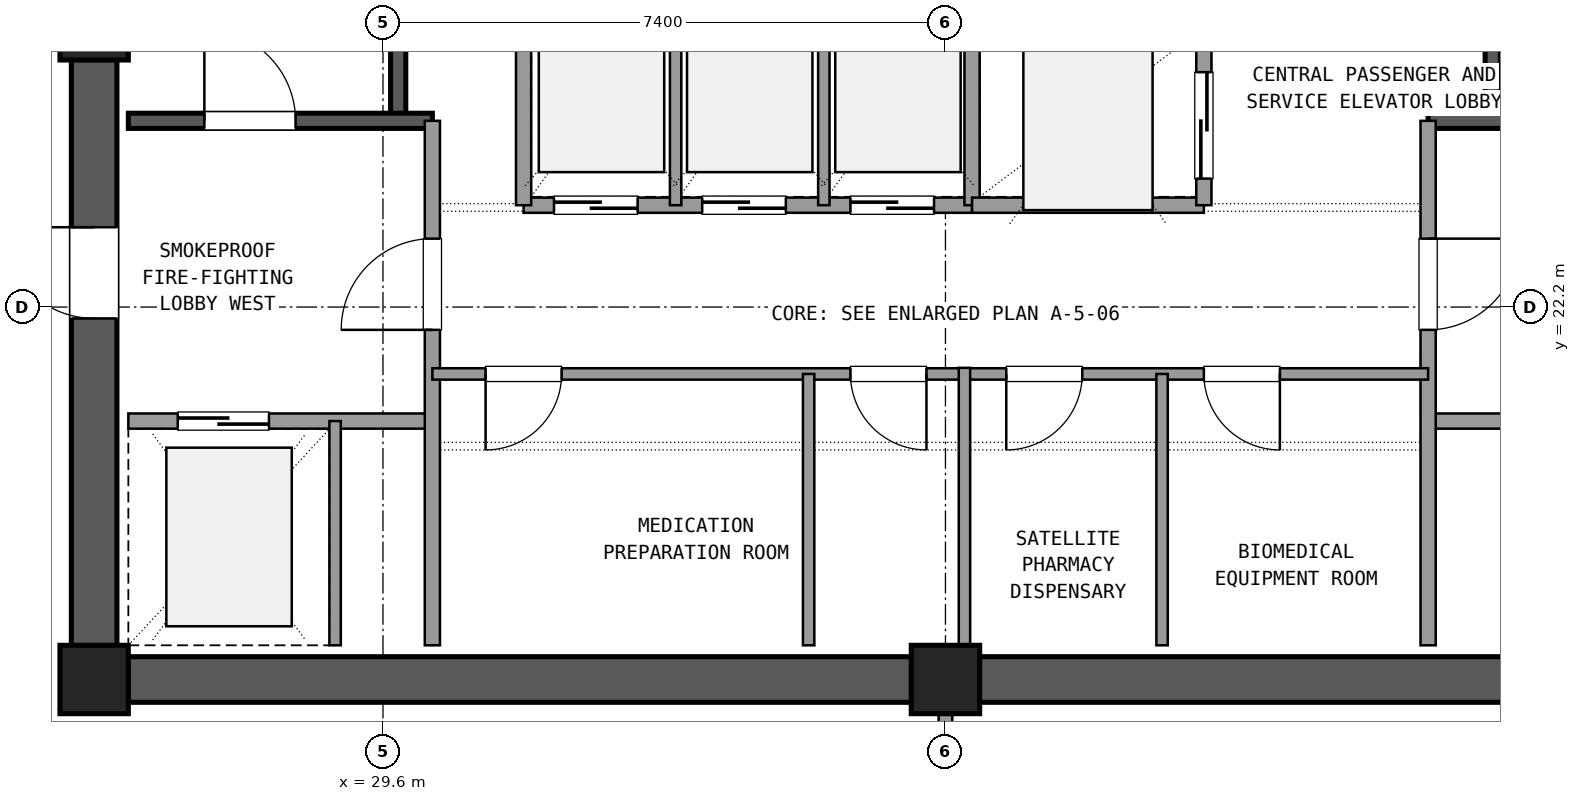
"""IFC4 building model, lengths in metres.
Left out: names, types, materials, properties, quantities, classifications, styles, units other than length and angle.
Written with IfcOpenShell. Run it as: python <this file> out.ifc"""

import sys

from ifc_helpers import new_model, si_unit, direction, frame, frame_2d, origin, origin_2d, place, context, subcontext, project, spatial, rectangle, extrude, element, fill, save


model = new_model("IFC4")
c1 = context("Model", 3, precision=1e-05, world=origin(), true_north=direction((0.0, 1.0)))
c2 = subcontext(c1, "Body", "Model", "MODEL_VIEW")
j1 = project(units=[si_unit("LENGTHUNIT", "METRE"), si_unit("PLANEANGLEUNIT", "RADIAN")], contexts=[c1])
p1 = place(None, origin())
s1 = spatial("IfcSite", under=j1, at=p1, CompositionType="ELEMENT")
p2 = place(p1, origin())
s2 = spatial("IfcBuilding", under=s1, at=p2, CompositionType="ELEMENT")
p3 = place(p2, frame((0.0, 0.0, 221.58)))
s3 = spatial("IfcBuildingStorey", under=s2, at=p3, CompositionType="ELEMENT", Elevation=221.58)
for number, where, z_axis, x_axis in (
    (1, (25.8, 17.3, 0.0), (0.0, 0.0, 1.0), (1.0, 0.0, 0.0)),
    (2, (37.0, 17.3, 0.0), (0.0, 0.0, 1.0), (1.0, 0.0, 0.0)),
    (3, (25.8, 25.9, 0.0), (0.0, 0.0, 1.0), (1.0, 0.0, 0.0)),
):
    element("IfcColumn", number, at=place(p3, frame(where, z_axis=z_axis, x_axis=x_axis)), inside=s3, PredefinedType="COLUMN", context=c2, shape_type="SweptSolid", body=[
        extrude(rectangle(XDim=0.9, YDim=0.9, at=origin_2d()), origin(), (0.0, 0.0, 1.0), 3.6),
    ])
for number, where, z_axis, x_axis in (
    (4, (26.245, 17.3, 0.0), (0.0, 0.0, 1.0), (1.0, 0.0, 0.0)),
    (5, (37.445, 17.3, 0.0), (0.0, 0.0, 1.0), (1.0, 0.0, 0.0)),
):
    element("IfcWall", number, at=place(p3, frame(where, z_axis=z_axis, x_axis=x_axis)), inside=s3, PredefinedType="SHEAR", context=c2, shape_type="SweptSolid", body=[
        extrude(rectangle(XDim=10.31, YDim=0.6, at=frame_2d((5.155, 0.0))), origin(), (0.0, 0.0, 1.0), 3.32),
    ])
p4 = place(p3, frame((25.8, 25.455, 0.0), z_axis=(0.0, 0.0, 1.0), x_axis=(0.0, -1.0, 0.0)))
e6 = element("IfcWall", 6, at=p4, inside=s3, PredefinedType="SHEAR", context=c2, shape_type="SweptSolid", body=[
    extrude(rectangle(XDim=7.71, YDim=0.6, at=frame_2d((3.855, 0.0))), origin(), (0.0, 0.0, 1.0), 3.32),
])
p5 = place(p4, frame((2.205, 0.0, 0.0)))
e7 = element("IfcOpeningElement", 7, at=p5, cuts=e6, PredefinedType="OPENING", context=c2, shape_type="SweptSolid", body=[
    extrude(rectangle(XDim=1.2, YDim=2.15, at=frame_2d((0.6, 1.075))), frame((0.0, 0.31, 0.0), z_axis=(0.0, -1.0, 0.0), x_axis=(1.0, 0.0, 0.0)), (0.0, 0.0, 1.0), 0.62),
])
p6 = place(p3, frame((29.8, 24.65, 0.0), z_axis=(0.0, 0.0, 1.0), x_axis=(0.0, 1.0, 0.0)))
e8 = element("IfcWall", 8, at=p6, inside=s3, PredefinedType="SHEAR", context=c2, shape_type="SweptSolid", body=[
    extrude(rectangle(XDim=9.4, YDim=0.2, at=frame_2d((4.7, 0.0))), origin(), (0.0, 0.0, 1.0), 3.32),
])
p7 = place(p3, frame((26.25, 24.65, 0.0), z_axis=(0.0, 0.0, 1.0), x_axis=(1.0, 0.0, 0.0)))
e9 = element("IfcWall", 9, at=p7, inside=s3, PredefinedType="SHEAR", context=c2, shape_type="SweptSolid", body=[
    extrude(rectangle(XDim=4.0, YDim=0.2, at=frame_2d((2.0, 0.0))), origin(), (0.0, 0.0, 1.0), 3.32),
])
p8 = place(p7, frame((1.0, 0.0, 0.0)))
e10 = element("IfcOpeningElement", 10, at=p8, cuts=e9, PredefinedType="OPENING", context=c2, shape_type="SweptSolid", body=[
    extrude(rectangle(XDim=1.2, YDim=2.15, at=frame_2d((0.6, 1.075))), frame((0.0, 0.11, 0.0), z_axis=(0.0, -1.0, 0.0), x_axis=(1.0, 0.0, 0.0)), (0.0, 0.0, 1.0), 0.22),
])
p9 = place(p3, frame((44.2, 24.65, 0.0), z_axis=(0.0, 0.0, 1.0), x_axis=(0.0, 1.0, 0.0)))
e11 = element("IfcWall", 11, at=p9, inside=s3, PredefinedType="SHEAR", context=c2, shape_type="SweptSolid", body=[
    extrude(rectangle(XDim=9.4, YDim=0.2, at=frame_2d((4.7, 0.0))), origin(), (0.0, 0.0, 1.0), 3.32),
])
p10 = place(p3, frame((43.35, 24.65, 0.0), z_axis=(0.0, 0.0, 1.0), x_axis=(1.0, 0.0, 0.0)))
e12 = element("IfcWall", 12, at=p10, inside=s3, PredefinedType="SHEAR", context=c2, shape_type="SweptSolid", body=[
    extrude(rectangle(XDim=4.4, YDim=0.2, at=frame_2d((2.2, 0.0))), origin(), (0.0, 0.0, 1.0), 3.32),
])
p11 = place(p10, frame((2.0, 0.0, 0.0)))
e13 = element("IfcOpeningElement", 13, at=p11, cuts=e12, PredefinedType="OPENING", context=c2, shape_type="SweptSolid", body=[
    extrude(rectangle(XDim=1.2, YDim=2.15, at=frame_2d((0.6, 1.075))), frame((0.0, 0.11, 0.0), z_axis=(0.0, -1.0, 0.0), x_axis=(1.0, 0.0, 0.0)), (0.0, 0.0, 1.0), 0.22),
])
p12 = place(p3, frame((26.25, 20.7, 0.0), z_axis=(0.0, 0.0, 1.0), x_axis=(1.0, 0.0, 0.0)))
e14 = element("IfcWall", 14, at=p12, inside=s3, PredefinedType="SOLIDWALL", context=c2, shape_type="SweptSolid", body=[
    extrude(rectangle(XDim=4.0, YDim=0.2, at=frame_2d((2.0, 0.0))), origin(), (0.0, 0.0, 1.0), 2.61),
])
p13 = place(p12, frame((0.65, 0.0, 0.0)))
e15 = element("IfcOpeningElement", 15, at=p13, cuts=e14, PredefinedType="OPENING", context=c2, shape_type="SweptSolid", body=[
    extrude(rectangle(XDim=1.2, YDim=2.15, at=frame_2d((0.6, 1.075))), frame((0.0, 0.11, 0.0), z_axis=(0.0, -1.0, 0.0), x_axis=(1.0, 0.0, 0.0)), (0.0, 0.0, 1.0), 0.22),
])
p14 = place(p3, frame((30.25, 17.75, 0.0), z_axis=(0.0, 0.0, 1.0), x_axis=(0.0, 1.0, 0.0)))
e16 = element("IfcWall", 16, at=p14, inside=s3, PredefinedType="SOLIDWALL", context=c2, shape_type="SweptSolid", body=[
    extrude(rectangle(XDim=6.9, YDim=0.2, at=frame_2d((3.45, 0.0))), origin(), (0.0, 0.0, 1.0), 2.61),
])
p15 = place(p14, frame((4.15, 0.0, 0.0)))
e17 = element("IfcOpeningElement", 17, at=p15, cuts=e16, PredefinedType="OPENING", context=c2, shape_type="SweptSolid", body=[
    extrude(rectangle(XDim=1.2, YDim=2.15, at=frame_2d((0.6, 1.075))), frame((0.0, 0.11, 0.0), z_axis=(0.0, -1.0, 0.0), x_axis=(1.0, 0.0, 0.0)), (0.0, 0.0, 1.0), 0.22),
])
p16 = place(p3, frame((28.97, 17.75, 0.0), z_axis=(0.0, 0.0, 1.0), x_axis=(0.0, 1.0, 0.0)))
e18 = element("IfcWall", 18, at=p16, inside=s3, PredefinedType="PARTITIONING", context=c2, shape_type="SweptSolid", body=[
    extrude(rectangle(XDim=2.95, YDim=0.15, at=frame_2d((1.475, 0.0))), origin(), (0.0, 0.0, 1.0), 2.61),
])
p17 = place(p3, frame((43.35, 20.7, 0.0), z_axis=(0.0, 0.0, 1.0), x_axis=(1.0, 0.0, 0.0)))
e19 = element("IfcWall", 19, at=p17, inside=s3, PredefinedType="SOLIDWALL", context=c2, shape_type="SweptSolid", body=[
    extrude(rectangle(XDim=4.4, YDim=0.2, at=frame_2d((2.2, 0.0))), origin(), (0.0, 0.0, 1.0), 2.61),
])
p18 = place(p17, frame((2.35, 0.0, 0.0)))
e20 = element("IfcOpeningElement", 20, at=p18, cuts=e19, PredefinedType="OPENING", context=c2, shape_type="SweptSolid", body=[
    extrude(rectangle(XDim=1.2, YDim=2.15, at=frame_2d((0.6, 1.075))), frame((0.0, 0.11, 0.0), z_axis=(0.0, -1.0, 0.0), x_axis=(1.0, 0.0, 0.0)), (0.0, 0.0, 1.0), 0.22),
])
p19 = place(p3, frame((43.35, 17.75, 0.0), z_axis=(0.0, 0.0, 1.0), x_axis=(0.0, 1.0, 0.0)))
e21 = element("IfcWall", 21, at=p19, inside=s3, PredefinedType="SOLIDWALL", context=c2, shape_type="SweptSolid", body=[
    extrude(rectangle(XDim=6.9, YDim=0.2, at=frame_2d((3.45, 0.0))), origin(), (0.0, 0.0, 1.0), 2.61),
])
p20 = place(p19, frame((4.15, 0.0, 0.0)))
e22 = element("IfcOpeningElement", 22, at=p20, cuts=e21, PredefinedType="OPENING", context=c2, shape_type="SweptSolid", body=[
    extrude(rectangle(XDim=1.2, YDim=2.15, at=frame_2d((0.6, 1.075))), frame((0.0, 0.11, 0.0), z_axis=(0.0, -1.0, 0.0), x_axis=(1.0, 0.0, 0.0)), (0.0, 0.0, 1.0), 0.22),
])
p21 = place(p3, frame((30.25, 21.32, 0.0), z_axis=(0.0, 0.0, 1.0), x_axis=(1.0, 0.0, 0.0)))
e23 = element("IfcWall", 23, at=p21, inside=s3, PredefinedType="PARTITIONING", context=c2, shape_type="SweptSolid", body=[
    extrude(rectangle(XDim=7.0, YDim=0.15, at=frame_2d((3.5, 0.0))), origin(), (0.0, 0.0, 1.0), 2.61),
])
p22 = place(p21, frame((0.7, 0.0, 0.0)))
e24 = element("IfcOpeningElement", 24, at=p22, cuts=e23, PredefinedType="OPENING", context=c2, shape_type="SweptSolid", body=[
    extrude(rectangle(XDim=1.0, YDim=2.15, at=frame_2d((0.5, 1.075))), frame((0.0, 0.085, 0.0), z_axis=(0.0, -1.0, 0.0), x_axis=(1.0, 0.0, 0.0)), (0.0, 0.0, 1.0), 0.17),
])
p23 = place(p21, frame((5.5, 0.0, 0.0)))
e25 = element("IfcOpeningElement", 25, at=p23, cuts=e23, PredefinedType="OPENING", context=c2, shape_type="SweptSolid", body=[
    extrude(rectangle(XDim=1.0, YDim=2.15, at=frame_2d((0.5, 1.075))), frame((0.0, 0.085, 0.0), z_axis=(0.0, -1.0, 0.0), x_axis=(1.0, 0.0, 0.0)), (0.0, 0.0, 1.0), 0.17),
])
p24 = place(p3, frame((35.2, 17.75, 0.0), z_axis=(0.0, 0.0, 1.0), x_axis=(0.0, 1.0, 0.0)))
e26 = element("IfcWall", 26, at=p24, inside=s3, PredefinedType="PARTITIONING", context=c2, shape_type="SweptSolid", body=[
    extrude(rectangle(XDim=3.57, YDim=0.15, at=frame_2d((1.785, 0.0))), origin(), (0.0, 0.0, 1.0), 2.61),
])
p25 = place(p3, frame((37.25, 21.32, 0.0), z_axis=(0.0, 0.0, 1.0), x_axis=(1.0, 0.0, 0.0)))
e27 = element("IfcWall", 27, at=p25, inside=s3, PredefinedType="PARTITIONING", context=c2, shape_type="SweptSolid", body=[
    extrude(rectangle(XDim=6.1, YDim=0.15, at=frame_2d((3.05, 0.0))), origin(), (0.0, 0.0, 1.0), 2.61),
])
p26 = place(p25, frame((0.55, 0.0, 0.0)))
e28 = element("IfcOpeningElement", 28, at=p26, cuts=e27, PredefinedType="OPENING", context=c2, shape_type="SweptSolid", body=[
    extrude(rectangle(XDim=1.0, YDim=2.15, at=frame_2d((0.5, 1.075))), frame((0.0, 0.085, 0.0), z_axis=(0.0, -1.0, 0.0), x_axis=(1.0, 0.0, 0.0)), (0.0, 0.0, 1.0), 0.17),
])
p27 = place(p25, frame((3.15, 0.0, 0.0)))
e29 = element("IfcOpeningElement", 29, at=p27, cuts=e27, PredefinedType="OPENING", context=c2, shape_type="SweptSolid", body=[
    extrude(rectangle(XDim=1.0, YDim=2.15, at=frame_2d((0.5, 1.075))), frame((0.0, 0.085, 0.0), z_axis=(0.0, -1.0, 0.0), x_axis=(1.0, 0.0, 0.0)), (0.0, 0.0, 1.0), 0.17),
])
p28 = place(p3, frame((39.85, 17.75, 0.0), z_axis=(0.0, 0.0, 1.0), x_axis=(0.0, 1.0, 0.0)))
e30 = element("IfcWall", 30, at=p28, inside=s3, PredefinedType="PARTITIONING", context=c2, shape_type="SweptSolid", body=[
    extrude(rectangle(XDim=3.57, YDim=0.15, at=frame_2d((1.785, 0.0))), origin(), (0.0, 0.0, 1.0), 2.61),
])
p29 = place(p3, frame((37.25, 17.75, 0.0), z_axis=(0.0, 0.0, 1.0), x_axis=(0.0, 1.0, 0.0)))
e31 = element("IfcWall", 31, at=p29, inside=s3, PredefinedType="PARTITIONING", context=c2, shape_type="SweptSolid", body=[
    extrude(rectangle(XDim=3.65, YDim=0.15, at=frame_2d((1.825, 0.0))), origin(), (0.0, 0.0, 1.0), 2.61),
])
p30 = place(p3, frame((31.45, 23.54, 0.0), z_axis=(0.0, 0.0, 1.0), x_axis=(1.0, 0.0, 0.0)))
e32 = element("IfcWall", 32, at=p30, inside=s3, PredefinedType="SOLIDWALL", context=c2, shape_type="SweptSolid", body=[
    extrude(rectangle(XDim=5.9, YDim=0.2, at=frame_2d((2.95, 0.0))), origin(), (0.0, 0.0, 1.0), 2.61),
])
p31 = place(p30, frame((0.4, 0.0, 0.0)))
e33 = element("IfcOpeningElement", 33, at=p31, cuts=e32, PredefinedType="OPENING", context=c2, shape_type="SweptSolid", body=[
    extrude(rectangle(XDim=1.1, YDim=2.15, at=frame_2d((0.55, 1.075))), frame((0.0, 0.11, 0.0), z_axis=(0.0, -1.0, 0.0), x_axis=(1.0, 0.0, 0.0)), (0.0, 0.0, 1.0), 0.22),
])
p32 = place(p30, frame((2.35, 0.0, 0.0)))
e34 = element("IfcOpeningElement", 34, at=p32, cuts=e32, PredefinedType="OPENING", context=c2, shape_type="SweptSolid", body=[
    extrude(rectangle(XDim=1.1, YDim=2.15, at=frame_2d((0.55, 1.075))), frame((0.0, 0.11, 0.0), z_axis=(0.0, -1.0, 0.0), x_axis=(1.0, 0.0, 0.0)), (0.0, 0.0, 1.0), 0.22),
])
p33 = place(p30, frame((4.3, 0.0, 0.0)))
e35 = element("IfcOpeningElement", 35, at=p33, cuts=e32, PredefinedType="OPENING", context=c2, shape_type="SweptSolid", body=[
    extrude(rectangle(XDim=1.1, YDim=2.15, at=frame_2d((0.55, 1.075))), frame((0.0, 0.11, 0.0), z_axis=(0.0, -1.0, 0.0), x_axis=(1.0, 0.0, 0.0)), (0.0, 0.0, 1.0), 0.22),
])
p34 = place(p3, frame((31.45, 23.54, 0.0), z_axis=(0.0, 0.0, 1.0), x_axis=(0.0, 1.0, 0.0)))
e36 = element("IfcWall", 36, at=p34, inside=s3, PredefinedType="SOLIDWALL", context=c2, shape_type="SweptSolid", body=[
    extrude(rectangle(XDim=2.81, YDim=0.2, at=frame_2d((1.405, 0.0))), origin(), (0.0, 0.0, 1.0), 2.61),
])
for number, where, z_axis, x_axis in (
    (37, (33.45, 23.54, 0.0), (0.0, 0.0, 1.0), (0.0, 1.0, 0.0)),
    (38, (35.4, 23.54, 0.0), (0.0, 0.0, 1.0), (0.0, 1.0, 0.0)),
):
    element("IfcWall", number, at=place(p3, frame(where, z_axis=z_axis, x_axis=x_axis)), inside=s3, PredefinedType="PARTITIONING", context=c2, shape_type="SweptSolid", body=[
        extrude(rectangle(XDim=2.81, YDim=0.15, at=frame_2d((1.405, 0.0))), origin(), (0.0, 0.0, 1.0), 2.61),
    ])
p35 = place(p3, frame((37.35, 23.54, 0.0), z_axis=(0.0, 0.0, 1.0), x_axis=(0.0, 1.0, 0.0)))
e39 = element("IfcWall", 39, at=p35, inside=s3, PredefinedType="SOLIDWALL", context=c2, shape_type="SweptSolid", body=[
    extrude(rectangle(XDim=6.82, YDim=0.2, at=frame_2d((3.41, 0.0))), origin(), (0.0, 0.0, 1.0), 2.61),
])
p36 = place(p3, frame((37.35, 23.54, 0.0), z_axis=(0.0, 0.0, 1.0), x_axis=(1.0, 0.0, 0.0)))
e40 = element("IfcWall", 40, at=p36, inside=s3, PredefinedType="SOLIDWALL", context=c2, shape_type="SweptSolid", body=[
    extrude(rectangle(XDim=3.05, YDim=0.2, at=frame_2d((1.525, 0.0))), origin(), (0.0, 0.0, 1.0), 2.61),
])
p37 = place(p3, frame((40.4, 23.54, 0.0), z_axis=(0.0, 0.0, 1.0), x_axis=(0.0, 1.0, 0.0)))
e41 = element("IfcWall", 41, at=p37, inside=s3, PredefinedType="SOLIDWALL", context=c2, shape_type="SweptSolid", body=[
    extrude(rectangle(XDim=6.82, YDim=0.2, at=frame_2d((3.41, 0.0))), origin(), (0.0, 0.0, 1.0), 2.61),
])
p38 = place(p37, frame((0.35, 0.0, 0.0)))
e42 = element("IfcOpeningElement", 42, at=p38, cuts=e41, PredefinedType="OPENING", context=c2, shape_type="SweptSolid", body=[
    extrude(rectangle(XDim=1.4, YDim=2.2, at=frame_2d((0.7, 1.1))), frame((0.0, 0.11, 0.0), z_axis=(0.0, -1.0, 0.0), x_axis=(1.0, 0.0, 0.0)), (0.0, 0.0, 1.0), 0.22),
])
p39 = place(p37, frame((2.65, 0.0, 0.0)))
e43 = element("IfcOpeningElement", 43, at=p39, cuts=e41, PredefinedType="OPENING", context=c2, shape_type="SweptSolid", body=[
    extrude(rectangle(XDim=1.4, YDim=2.2, at=frame_2d((0.7, 1.1))), frame((0.0, 0.11, 0.0), z_axis=(0.0, -1.0, 0.0), x_axis=(1.0, 0.0, 0.0)), (0.0, 0.0, 1.0), 0.22),
])
p40 = place(p37, frame((4.85, 0.0, 0.0)))
e44 = element("IfcOpeningElement", 44, at=p40, cuts=e41, PredefinedType="OPENING", context=c2, shape_type="SweptSolid", body=[
    extrude(rectangle(XDim=1.4, YDim=2.2, at=frame_2d((0.7, 1.1))), frame((0.0, 0.11, 0.0), z_axis=(0.0, -1.0, 0.0), x_axis=(1.0, 0.0, 0.0)), (0.0, 0.0, 1.0), 0.22),
])
p41 = place(p3, frame((37.0, 14.15, 0.0), z_axis=(0.0, 0.0, 1.0), x_axis=(0.0, 1.0, 0.0)))
e45 = element("IfcWall", 45, at=p41, inside=s3, PredefinedType="PARTITIONING", context=c2, shape_type="SweptSolid", body=[
    extrude(rectangle(XDim=2.7, YDim=0.18, at=frame_2d((1.35, 0.0))), origin(), (0.0, 0.0, 1.0), 2.61),
])
p42 = place(p41, frame((0.35, 0.0, 0.0)))
e46 = element("IfcOpeningElement", 46, at=p42, cuts=e45, PredefinedType="OPENING", context=c2, shape_type="SweptSolid", body=[
    extrude(rectangle(XDim=2.0, YDim=2.2, at=frame_2d((1.0, 1.1))), frame((0.0, 0.1, 0.0), z_axis=(0.0, -1.0, 0.0), x_axis=(1.0, 0.0, 0.0)), (0.0, 0.0, 1.0), 0.2),
])
p43 = place(p8, origin())
e47 = element("IfcDoor", 47, at=p43, inside=s3, OperationType="SINGLE_SWING_LEFT", PredefinedType="DOOR", context=c2, shape_type="SweptSolid", body=[
    extrude(rectangle(XDim=1.2, YDim=2.15, at=frame_2d((0.6, 1.075))), frame((0.0, 0.025, 0.0), z_axis=(0.0, -1.0, 0.0), x_axis=(1.0, 0.0, 0.0)), (0.0, 0.0, 1.0), 0.05),
])
fill(e10, e47)
p44 = place(p13, origin())
e48 = element("IfcDoor", 48, at=p44, inside=s3, OperationType="SLIDING_TO_LEFT", PredefinedType="DOOR", context=c2, shape_type="SweptSolid", body=[
    extrude(rectangle(XDim=1.2, YDim=2.15, at=frame_2d((0.6, 1.075))), frame((0.0, 0.025, 0.0), z_axis=(0.0, -1.0, 0.0), x_axis=(1.0, 0.0, 0.0)), (0.0, 0.0, 1.0), 0.05),
])
fill(e15, e48)
p45 = place(p15, origin())
e49 = element("IfcDoor", 49, at=p45, inside=s3, OperationType="SINGLE_SWING_LEFT", PredefinedType="DOOR", context=c2, shape_type="SweptSolid", body=[
    extrude(rectangle(XDim=1.2, YDim=2.15, at=frame_2d((0.6, 1.075))), frame((0.0, 0.025, 0.0), z_axis=(0.0, -1.0, 0.0), x_axis=(1.0, 0.0, 0.0)), (0.0, 0.0, 1.0), 0.05),
])
fill(e17, e49)
p46 = place(p20, frame((1.2, 0.0, 0.0), z_axis=(0.0, 0.0, 1.0), x_axis=(-1.0, 0.0, 0.0)))
e50 = element("IfcDoor", 50, at=p46, inside=s3, OperationType="SINGLE_SWING_RIGHT", PredefinedType="DOOR", context=c2, shape_type="SweptSolid", body=[
    extrude(rectangle(XDim=1.2, YDim=2.15, at=frame_2d((0.6, 1.075))), frame((0.0, 0.025, 0.0), z_axis=(0.0, -1.0, 0.0), x_axis=(1.0, 0.0, 0.0)), (0.0, 0.0, 1.0), 0.05),
])
fill(e22, e50)
p47 = place(p5, frame((1.2, 0.0, 0.0), z_axis=(0.0, 0.0, 1.0), x_axis=(-1.0, 0.0, 0.0)))
e51 = element("IfcDoor", 51, at=p47, inside=s3, OperationType="SINGLE_SWING_LEFT", PredefinedType="DOOR", context=c2, shape_type="SweptSolid", body=[
    extrude(rectangle(XDim=1.2, YDim=2.15, at=frame_2d((0.6, 1.075))), frame((0.0, 0.025, 0.0), z_axis=(0.0, -1.0, 0.0), x_axis=(1.0, 0.0, 0.0)), (0.0, 0.0, 1.0), 0.05),
])
fill(e7, e51)
p48 = place(p22, frame((1.0, 0.0, 0.0), z_axis=(0.0, 0.0, 1.0), x_axis=(-1.0, 0.0, 0.0)))
e52 = element("IfcDoor", 52, at=p48, inside=s3, OperationType="SINGLE_SWING_LEFT", PredefinedType="DOOR", context=c2, shape_type="SweptSolid", body=[
    extrude(rectangle(XDim=1.0, YDim=2.15, at=frame_2d((0.5, 1.075))), frame((0.0, 0.025, 0.0), z_axis=(0.0, -1.0, 0.0), x_axis=(1.0, 0.0, 0.0)), (0.0, 0.0, 1.0), 0.05),
])
fill(e24, e52)
p49 = place(p23, frame((1.0, 0.0, 0.0), z_axis=(0.0, 0.0, 1.0), x_axis=(-1.0, 0.0, 0.0)))
e53 = element("IfcDoor", 53, at=p49, inside=s3, OperationType="SINGLE_SWING_RIGHT", PredefinedType="DOOR", context=c2, shape_type="SweptSolid", body=[
    extrude(rectangle(XDim=1.0, YDim=2.15, at=frame_2d((0.5, 1.075))), frame((0.0, 0.025, 0.0), z_axis=(0.0, -1.0, 0.0), x_axis=(1.0, 0.0, 0.0)), (0.0, 0.0, 1.0), 0.05),
])
fill(e25, e53)
p50 = place(p26, frame((1.0, 0.0, 0.0), z_axis=(0.0, 0.0, 1.0), x_axis=(-1.0, 0.0, 0.0)))
e54 = element("IfcDoor", 54, at=p50, inside=s3, OperationType="SINGLE_SWING_LEFT", PredefinedType="DOOR", context=c2, shape_type="SweptSolid", body=[
    extrude(rectangle(XDim=1.0, YDim=2.15, at=frame_2d((0.5, 1.075))), frame((0.0, 0.025, 0.0), z_axis=(0.0, -1.0, 0.0), x_axis=(1.0, 0.0, 0.0)), (0.0, 0.0, 1.0), 0.05),
])
fill(e28, e54)
p51 = place(p27, frame((1.0, 0.0, 0.0), z_axis=(0.0, 0.0, 1.0), x_axis=(-1.0, 0.0, 0.0)))
e55 = element("IfcDoor", 55, at=p51, inside=s3, OperationType="SINGLE_SWING_RIGHT", PredefinedType="DOOR", context=c2, shape_type="SweptSolid", body=[
    extrude(rectangle(XDim=1.0, YDim=2.15, at=frame_2d((0.5, 1.075))), frame((0.0, 0.025, 0.0), z_axis=(0.0, -1.0, 0.0), x_axis=(1.0, 0.0, 0.0)), (0.0, 0.0, 1.0), 0.05),
])
fill(e29, e55)
p52 = place(p31, origin())
e56 = element("IfcDoor", 56, at=p52, inside=s3, OperationType="SLIDING_TO_RIGHT", PredefinedType="DOOR", context=c2, shape_type="SweptSolid", body=[
    extrude(rectangle(XDim=1.1, YDim=2.15, at=frame_2d((0.55, 1.075))), frame((0.0, 0.025, 0.0), z_axis=(0.0, -1.0, 0.0), x_axis=(1.0, 0.0, 0.0)), (0.0, 0.0, 1.0), 0.05),
])
fill(e33, e56)
p53 = place(p32, origin())
e57 = element("IfcDoor", 57, at=p53, inside=s3, OperationType="SLIDING_TO_RIGHT", PredefinedType="DOOR", context=c2, shape_type="SweptSolid", body=[
    extrude(rectangle(XDim=1.1, YDim=2.15, at=frame_2d((0.55, 1.075))), frame((0.0, 0.025, 0.0), z_axis=(0.0, -1.0, 0.0), x_axis=(1.0, 0.0, 0.0)), (0.0, 0.0, 1.0), 0.05),
])
fill(e34, e57)
p54 = place(p33, origin())
e58 = element("IfcDoor", 58, at=p54, inside=s3, OperationType="SLIDING_TO_RIGHT", PredefinedType="DOOR", context=c2, shape_type="SweptSolid", body=[
    extrude(rectangle(XDim=1.1, YDim=2.15, at=frame_2d((0.55, 1.075))), frame((0.0, 0.025, 0.0), z_axis=(0.0, -1.0, 0.0), x_axis=(1.0, 0.0, 0.0)), (0.0, 0.0, 1.0), 0.05),
])
fill(e35, e58)
p55 = place(p38, origin())
e59 = element("IfcDoor", 59, at=p55, inside=s3, OperationType="SLIDING_TO_LEFT", PredefinedType="DOOR", context=c2, shape_type="SweptSolid", body=[
    extrude(rectangle(XDim=1.4, YDim=2.2, at=frame_2d((0.7, 1.1))), frame((0.0, 0.025, 0.0), z_axis=(0.0, -1.0, 0.0), x_axis=(1.0, 0.0, 0.0)), (0.0, 0.0, 1.0), 0.05),
])
fill(e42, e59)
save(model, sys.argv[1])
